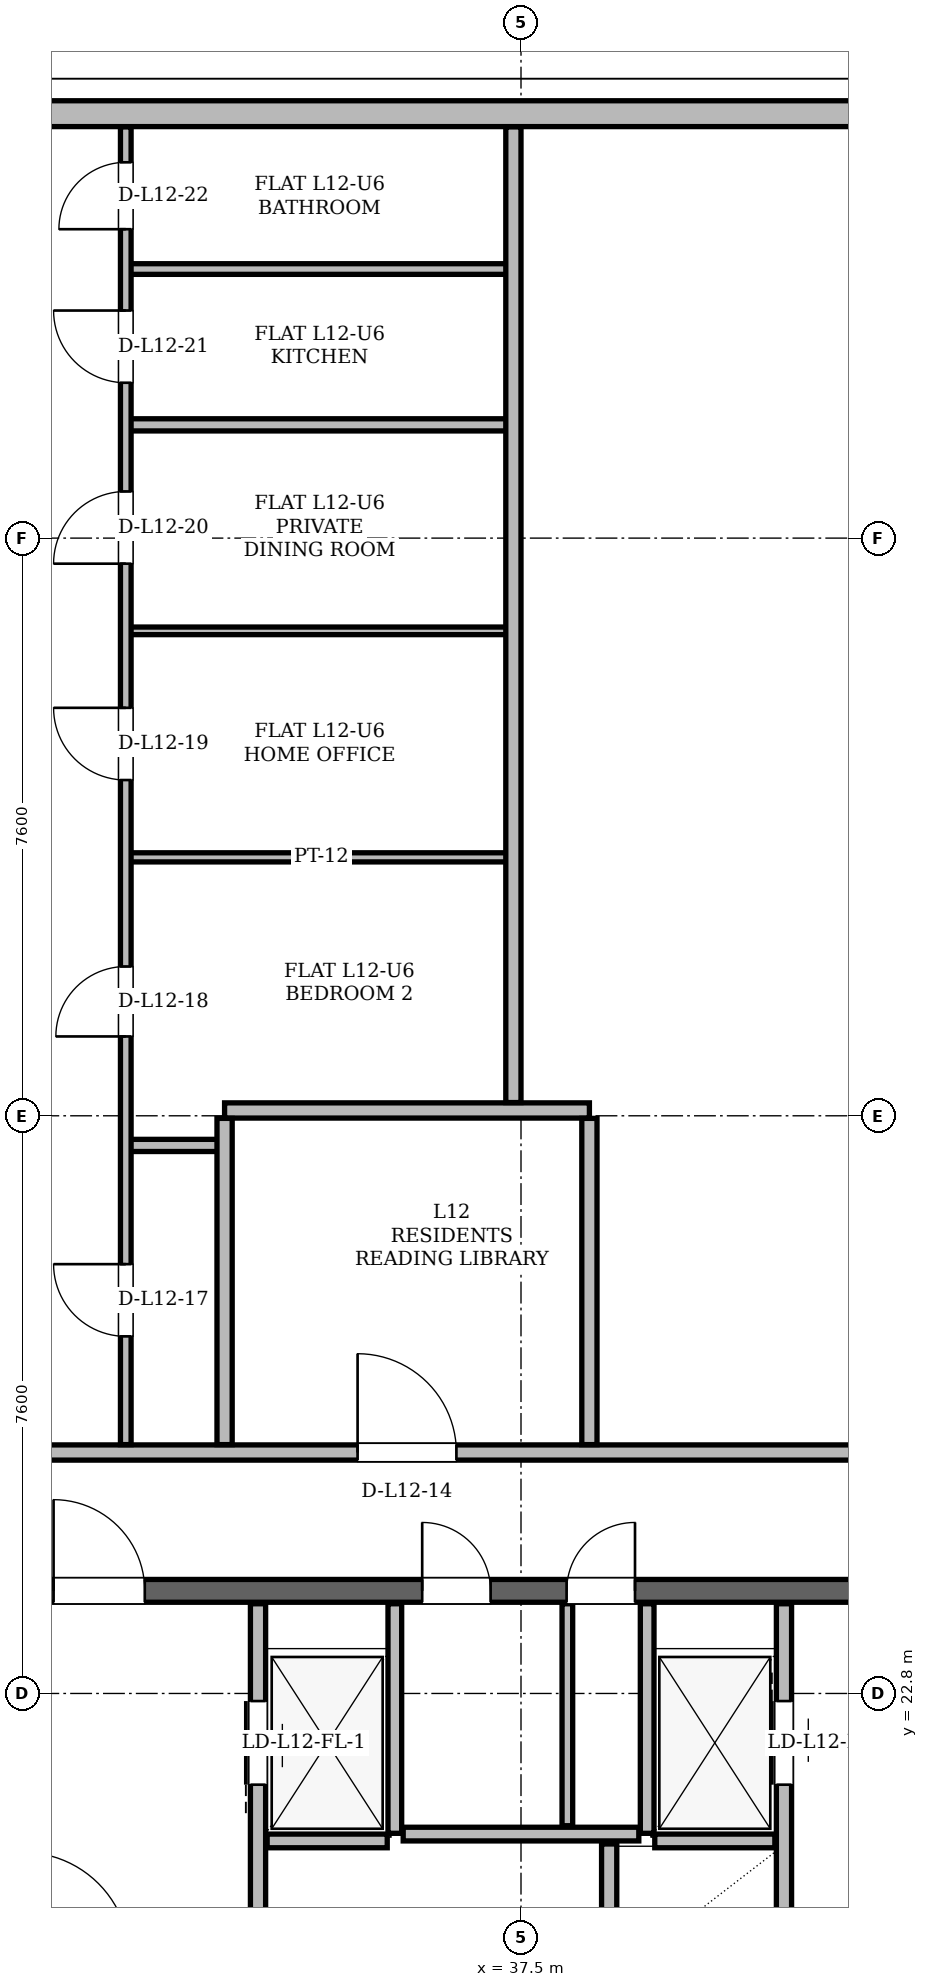
"""IFC4 building model, lengths in metres.
Left out: names, types, materials, properties, quantities, classifications, styles, units other than length and angle.
Written with IfcOpenShell. Run it as: python <this file> out.ifc"""

import sys

from ifc_helpers import new_model, si_unit, direction, frame, frame_2d, origin, place, context, subcontext, project, spatial, rectangle, extrude, element, fill, save


model = new_model("IFC4")
c1 = context("Model", 3, precision=1e-05, world=origin(), true_north=direction((0.0, 1.0)))
c2 = subcontext(c1, "Body", "Model", "MODEL_VIEW")
j1 = project(units=[si_unit("LENGTHUNIT", "METRE"), si_unit("PLANEANGLEUNIT", "RADIAN")], contexts=[c1])
p1 = place(None, origin())
s1 = spatial("IfcSite", under=j1, at=p1, CompositionType="ELEMENT")
p2 = place(p1, origin())
s2 = spatial("IfcBuilding", under=s1, at=p2, CompositionType="ELEMENT")
p3 = place(p2, frame((0.0, 0.0, 48.9)))
s3 = spatial("IfcBuildingStorey", under=s2, at=p3, CompositionType="ELEMENT", Elevation=48.9)
p4 = place(p3, frame((29.65, 24.15, 0.0), z_axis=(0.0, 0.0, 1.0), x_axis=(1.0, 0.0, 0.0)))
e1 = element("IfcWall", 1, at=p4, inside=s3, PredefinedType="SHEAR", context=c2, shape_type="SweptSolid", body=[
    extrude(rectangle(XDim=15.7, YDim=0.3, at=frame_2d((7.85, 0.0))), origin(), (0.0, 0.0, 1.0), 3.36),
])
p5 = place(p4, frame((1.7, 0.0, 0.0)))
e2 = element("IfcOpeningElement", 2, at=p5, cuts=e1, PredefinedType="OPENING", context=c2, shape_type="SweptSolid", body=[
    extrude(rectangle(XDim=1.2, YDim=2.2, at=frame_2d((0.6, 1.1))), frame((0.0, 0.15, 0.0), z_axis=(0.0, -1.0, 0.0), x_axis=(1.0, 0.0, 0.0)), (0.0, 0.0, 1.0), 0.3),
])
p6 = place(p4, frame((12.8, 0.0, 0.0)))
e3 = element("IfcOpeningElement", 3, at=p6, cuts=e1, PredefinedType="OPENING", context=c2, shape_type="SweptSolid", body=[
    extrude(rectangle(XDim=1.2, YDim=2.2, at=frame_2d((0.6, 1.1))), frame((0.0, 0.15, 0.0), z_axis=(0.0, -1.0, 0.0), x_axis=(1.0, 0.0, 0.0)), (0.0, 0.0, 1.0), 0.3),
])
p7 = place(p4, frame((6.55, 0.0, 0.0)))
e4 = element("IfcOpeningElement", 4, at=p7, cuts=e1, PredefinedType="OPENING", context=c2, shape_type="SweptSolid", body=[
    extrude(rectangle(XDim=0.9, YDim=2.05, at=frame_2d((0.45, 1.025))), frame((0.0, 0.15, 0.0), z_axis=(0.0, -1.0, 0.0), x_axis=(1.0, 0.0, 0.0)), (0.0, 0.0, 1.0), 0.3),
])
p8 = place(p4, frame((8.45, 0.0, 0.0)))
e5 = element("IfcOpeningElement", 5, at=p8, cuts=e1, PredefinedType="OPENING", context=c2, shape_type="SweptSolid", body=[
    extrude(rectangle(XDim=0.9, YDim=2.05, at=frame_2d((0.45, 1.025))), frame((0.0, 0.15, 0.0), z_axis=(0.0, -1.0, 0.0), x_axis=(1.0, 0.0, 0.0)), (0.0, 0.0, 1.0), 0.3),
])
p9 = place(p3, frame((44.867, 43.584, 0.0), z_axis=(0.0, 0.0, 1.0), x_axis=(-1.0, 0.0, 0.0)))
e6 = element("IfcWall", 6, at=p9, inside=s3, PredefinedType="SOLIDWALL", context=c2, shape_type="SweptSolid", body=[
    extrude(rectangle(XDim=14.733, YDim=0.34, at=frame_2d((7.367, 0.0))), origin(), (0.0, 0.0, 1.0), 2.494),
])
p10 = place(p3, frame((34.04, 19.48, 0.0), z_axis=(0.0, 0.0, 1.0), x_axis=(0.0, 1.0, 0.0)))
e7 = element("IfcWall", 7, at=p10, inside=s3, PredefinedType="PARTITIONING", context=c2, shape_type="SweptSolid", body=[
    extrude(rectangle(XDim=4.5, YDim=0.2, at=frame_2d((2.25, 0.0))), origin(), (0.0, 0.0, 1.0), 2.4),
])
p11 = place(p10, frame((2.12, 0.0, 0.0)))
e8 = element("IfcOpeningElement", 8, at=p11, cuts=e7, PredefinedType="OPENING", context=c2, shape_type="SweptSolid", body=[
    extrude(rectangle(XDim=1.1, YDim=2.2, at=frame_2d((0.55, 1.1))), frame((0.0, 0.1, 0.0), z_axis=(0.0, -1.0, 0.0), x_axis=(1.0, 0.0, 0.0)), (0.0, 0.0, 1.0), 0.2),
])
p12 = place(p3, frame((35.84, 20.96, 0.0), z_axis=(0.0, 0.0, 1.0), x_axis=(0.0, 1.0, 0.0)))
e9 = element("IfcWall", 9, at=p12, inside=s3, PredefinedType="PARTITIONING", context=c2, shape_type="SweptSolid", body=[
    extrude(rectangle(XDim=3.02, YDim=0.18, at=frame_2d((1.51, 0.0))), origin(), (0.0, 0.0, 1.0), 2.4),
])
p13 = place(p3, frame((34.16, 20.86, 0.0), z_axis=(0.0, 0.0, 1.0), x_axis=(1.0, 0.0, 0.0)))
e10 = element("IfcWall", 10, at=p13, inside=s3, PredefinedType="PARTITIONING", context=c2, shape_type="SweptSolid", body=[
    extrude(rectangle(XDim=1.58, YDim=0.18, at=frame_2d((0.79, 0.0))), origin(), (0.0, 0.0, 1.0), 3.36),
])
p14 = place(p3, frame((40.96, 19.48, 0.0), z_axis=(0.0, 0.0, 1.0), x_axis=(0.0, 1.0, 0.0)))
e11 = element("IfcWall", 11, at=p14, inside=s3, PredefinedType="PARTITIONING", context=c2, shape_type="SweptSolid", body=[
    extrude(rectangle(XDim=4.5, YDim=0.2, at=frame_2d((2.25, 0.0))), origin(), (0.0, 0.0, 1.0), 2.4),
])
p15 = place(p14, frame((2.12, 0.0, 0.0)))
e12 = element("IfcOpeningElement", 12, at=p15, cuts=e11, PredefinedType="OPENING", context=c2, shape_type="SweptSolid", body=[
    extrude(rectangle(XDim=1.1, YDim=2.2, at=frame_2d((0.55, 1.1))), frame((0.0, 0.1, 0.0), z_axis=(0.0, -1.0, 0.0), x_axis=(1.0, 0.0, 0.0)), (0.0, 0.0, 1.0), 0.2),
])
p16 = place(p3, frame((39.16, 20.96, 0.0), z_axis=(0.0, 0.0, 1.0), x_axis=(0.0, 1.0, 0.0)))
e13 = element("IfcWall", 13, at=p16, inside=s3, PredefinedType="PARTITIONING", context=c2, shape_type="SweptSolid", body=[
    extrude(rectangle(XDim=3.02, YDim=0.18, at=frame_2d((1.51, 0.0))), origin(), (0.0, 0.0, 1.0), 2.4),
])
p17 = place(p3, frame((39.26, 20.86, 0.0), z_axis=(0.0, 0.0, 1.0), x_axis=(1.0, 0.0, 0.0)))
e14 = element("IfcWall", 14, at=p17, inside=s3, PredefinedType="PARTITIONING", context=c2, shape_type="SweptSolid", body=[
    extrude(rectangle(XDim=1.58, YDim=0.18, at=frame_2d((0.79, 0.0))), origin(), (0.0, 0.0, 1.0), 3.36),
])
p18 = place(p3, frame((38.66, 11.72, 0.0), z_axis=(0.0, 0.0, 1.0), x_axis=(0.0, 1.0, 0.0)))
e15 = element("IfcWall", 15, at=p18, inside=s3, PredefinedType="PARTITIONING", context=c2, shape_type="SweptSolid", body=[
    extrude(rectangle(XDim=9.1, YDim=0.2, at=frame_2d((4.55, 0.0))), origin(), (0.0, 0.0, 1.0), 3.36),
])
p19 = place(p3, frame((35.95, 20.95, 0.0), z_axis=(0.0, 0.0, 1.0), x_axis=(1.0, 0.0, 0.0)))
e16 = element("IfcWall", 16, at=p19, inside=s3, PredefinedType="PARTITIONING", context=c2, shape_type="SweptSolid", body=[
    extrude(rectangle(XDim=3.1, YDim=0.18, at=frame_2d((1.55, 0.0))), origin(), (0.0, 0.0, 1.0), 3.36),
])
p20 = place(p3, frame((38.11, 21.06, 0.0), z_axis=(0.0, 0.0, 1.0), x_axis=(0.0, 1.0, 0.0)))
e17 = element("IfcWall", 17, at=p20, inside=s3, PredefinedType="PARTITIONING", context=c2, shape_type="SweptSolid", body=[
    extrude(rectangle(XDim=2.92, YDim=0.14, at=frame_2d((1.46, 0.0))), origin(), (0.0, 0.0, 1.0), 2.4),
])
p21 = place(p3, frame((27.55, 25.97, 0.0), z_axis=(0.0, 0.0, 1.0), x_axis=(1.0, 0.0, 0.0)))
e18 = element("IfcWall", 18, at=p21, inside=s3, PredefinedType="PARTITIONING", context=c2, shape_type="SweptSolid", body=[
    extrude(rectangle(XDim=19.9, YDim=0.2, at=frame_2d((9.95, 0.0))), origin(), (0.0, 0.0, 1.0), 2.738),
])
p22 = place(p21, frame((2.042, 0.0, 0.0)))
e19 = element("IfcOpeningElement", 19, at=p22, cuts=e18, PredefinedType="OPENING", context=c2, shape_type="SweptSolid", body=[
    extrude(rectangle(XDim=1.0, YDim=2.18, at=frame_2d((0.5, 1.09))), frame((0.0, 0.1, 0.0), z_axis=(0.0, -1.0, 0.0), x_axis=(1.0, 0.0, 0.0)), (0.0, 0.0, 1.0), 0.2),
])
p23 = place(p21, frame((7.8, 0.0, 0.0)))
e20 = element("IfcOpeningElement", 20, at=p23, cuts=e18, PredefinedType="OPENING", context=c2, shape_type="SweptSolid", body=[
    extrude(rectangle(XDim=1.3, YDim=2.2, at=frame_2d((0.65, 1.1))), frame((0.0, 0.1, 0.0), z_axis=(0.0, -1.0, 0.0), x_axis=(1.0, 0.0, 0.0)), (0.0, 0.0, 1.0), 0.2),
])
p24 = place(p3, frame((32.3, 30.01, 0.0), z_axis=(0.0, 0.0, 1.0), x_axis=(1.0, 0.0, 0.0)))
e21 = element("IfcWall", 21, at=p24, inside=s3, PredefinedType="PARTITIONING", context=c2, shape_type="SweptSolid", body=[
    extrude(rectangle(XDim=1.35, YDim=0.16, at=frame_2d((0.675, 0.0))), origin(), (0.0, 0.0, 1.0), 3.36),
])
p25 = place(p3, frame((33.6, 30.47, 0.0), z_axis=(0.0, 0.0, 1.0), x_axis=(1.0, 0.0, 0.0)))
e22 = element("IfcWall", 22, at=p25, inside=s3, PredefinedType="PARTITIONING", context=c2, shape_type="SweptSolid", body=[
    extrude(rectangle(XDim=4.8, YDim=0.2, at=frame_2d((2.4, 0.0))), origin(), (0.0, 0.0, 1.0), 3.36),
])
p26 = place(p3, frame((32.3, 33.8, 0.0), z_axis=(0.0, 0.0, 1.0), x_axis=(1.0, 0.0, 0.0)))
e23 = element("IfcWall", 23, at=p26, inside=s3, PredefinedType="PARTITIONING", context=c2, shape_type="SweptSolid", body=[
    extrude(rectangle(XDim=5.15, YDim=0.12, at=frame_2d((2.575, 0.0))), origin(), (0.0, 0.0, 1.0), 3.36),
])
p27 = place(p3, frame((32.3, 36.78, 0.0), z_axis=(0.0, 0.0, 1.0), x_axis=(1.0, 0.0, 0.0)))
e24 = element("IfcWall", 24, at=p27, inside=s3, PredefinedType="PARTITIONING", context=c2, shape_type="SweptSolid", body=[
    extrude(rectangle(XDim=5.15, YDim=0.1, at=frame_2d((2.575, 0.0))), origin(), (0.0, 0.0, 1.0), 3.36),
])
p28 = place(p3, frame((32.3, 39.49, 0.0), z_axis=(0.0, 0.0, 1.0), x_axis=(1.0, 0.0, 0.0)))
e25 = element("IfcWall", 25, at=p28, inside=s3, PredefinedType="PARTITIONING", context=c2, shape_type="SweptSolid", body=[
    extrude(rectangle(XDim=5.15, YDim=0.16, at=frame_2d((2.575, 0.0))), origin(), (0.0, 0.0, 1.0), 3.36),
])
p29 = place(p3, frame((32.3, 41.54, 0.0), z_axis=(0.0, 0.0, 1.0), x_axis=(1.0, 0.0, 0.0)))
e26 = element("IfcWall", 26, at=p29, inside=s3, PredefinedType="PARTITIONING", context=c2, shape_type="SweptSolid", body=[
    extrude(rectangle(XDim=5.15, YDim=0.14, at=frame_2d((2.575, 0.0))), origin(), (0.0, 0.0, 1.0), 3.36),
])
p30 = place(p3, frame((32.3, 26.074, 0.0), z_axis=(0.0, 0.0, 1.0), x_axis=(0.0, 1.0, 0.0)))
e27 = element("IfcWall", 27, at=p30, inside=s3, PredefinedType="PARTITIONING", context=c2, shape_type="SweptSolid", body=[
    extrude(rectangle(XDim=17.336, YDim=0.14, at=frame_2d((8.668, 0.0))), origin(), (0.0, 0.0, 1.0), 3.36),
])
p31 = place(p30, frame((1.424, 0.0, 0.0)))
e28 = element("IfcOpeningElement", 28, at=p31, cuts=e27, PredefinedType="OPENING", context=c2, shape_type="SweptSolid", body=[
    extrude(rectangle(XDim=0.95, YDim=2.1, at=frame_2d((0.475, 1.05))), frame((0.0, 0.07, 0.0), z_axis=(0.0, -1.0, 0.0), x_axis=(1.0, 0.0, 0.0)), (0.0, 0.0, 1.0), 0.14),
])
p32 = place(p30, frame((5.37, 0.0, 0.0)))
e29 = element("IfcOpeningElement", 29, at=p32, cuts=e27, PredefinedType="OPENING", context=c2, shape_type="SweptSolid", body=[
    extrude(rectangle(XDim=0.92, YDim=2.12, at=frame_2d((0.46, 1.06))), frame((0.0, 0.07, 0.0), z_axis=(0.0, -1.0, 0.0), x_axis=(1.0, 0.0, 0.0)), (0.0, 0.0, 1.0), 0.14),
])
p33 = place(p30, frame((8.743, 0.0, 0.0)))
e30 = element("IfcOpeningElement", 30, at=p33, cuts=e27, PredefinedType="OPENING", context=c2, shape_type="SweptSolid", body=[
    extrude(rectangle(XDim=0.95, YDim=2.1, at=frame_2d((0.475, 1.05))), frame((0.0, 0.07, 0.0), z_axis=(0.0, -1.0, 0.0), x_axis=(1.0, 0.0, 0.0)), (0.0, 0.0, 1.0), 0.14),
])
p34 = place(p30, frame((11.59, 0.0, 0.0)))
e31 = element("IfcOpeningElement", 31, at=p34, cuts=e27, PredefinedType="OPENING", context=c2, shape_type="SweptSolid", body=[
    extrude(rectangle(XDim=0.95, YDim=2.1, at=frame_2d((0.475, 1.05))), frame((0.0, 0.07, 0.0), z_axis=(0.0, -1.0, 0.0), x_axis=(1.0, 0.0, 0.0)), (0.0, 0.0, 1.0), 0.14),
])
p35 = place(p30, frame((13.97, 0.0, 0.0)))
e32 = element("IfcOpeningElement", 32, at=p35, cuts=e27, PredefinedType="OPENING", context=c2, shape_type="SweptSolid", body=[
    extrude(rectangle(XDim=0.95, YDim=2.1, at=frame_2d((0.475, 1.05))), frame((0.0, 0.07, 0.0), z_axis=(0.0, -1.0, 0.0), x_axis=(1.0, 0.0, 0.0)), (0.0, 0.0, 1.0), 0.14),
])
p36 = place(p30, frame((15.99, 0.0, 0.0)))
e33 = element("IfcOpeningElement", 33, at=p36, cuts=e27, PredefinedType="OPENING", context=c2, shape_type="SweptSolid", body=[
    extrude(rectangle(XDim=0.88, YDim=2.08, at=frame_2d((0.44, 1.04))), frame((0.0, 0.07, 0.0), z_axis=(0.0, -1.0, 0.0), x_axis=(1.0, 0.0, 0.0)), (0.0, 0.0, 1.0), 0.14),
])
p37 = place(p3, frame((33.6, 26.074, 0.0), z_axis=(0.0, 0.0, 1.0), x_axis=(0.0, 1.0, 0.0)))
e34 = element("IfcWall", 34, at=p37, inside=s3, PredefinedType="PARTITIONING", context=c2, shape_type="SweptSolid", body=[
    extrude(rectangle(XDim=4.292, YDim=0.2, at=frame_2d((2.146, 0.0))), origin(), (0.0, 0.0, 1.0), 3.36),
])
p38 = place(p3, frame((37.4, 30.574, 0.0), z_axis=(0.0, 0.0, 1.0), x_axis=(0.0, 1.0, 0.0)))
e35 = element("IfcWall", 35, at=p38, inside=s3, PredefinedType="PARTITIONING", context=c2, shape_type="SweptSolid", body=[
    extrude(rectangle(XDim=12.836, YDim=0.2, at=frame_2d((6.418, 0.0))), origin(), (0.0, 0.0, 1.0), 3.36),
])
p39 = place(p3, frame((38.4, 26.074, 0.0), z_axis=(0.0, 0.0, 1.0), x_axis=(0.0, 1.0, 0.0)))
e36 = element("IfcWall", 36, at=p39, inside=s3, PredefinedType="PARTITIONING", context=c2, shape_type="SweptSolid", body=[
    extrude(rectangle(XDim=4.292, YDim=0.2, at=frame_2d((2.146, 0.0))), origin(), (0.0, 0.0, 1.0), 3.36),
])
p40 = place(p11, origin())
e37 = element("IfcDoor", 37, at=p40, inside=s3, OperationType="SLIDING_TO_LEFT", PredefinedType="DOOR", context=c2, shape_type="SweptSolid", body=[
    extrude(rectangle(XDim=1.1, YDim=2.2, at=frame_2d((0.55, 1.1))), frame((0.0, 0.025, 0.0), z_axis=(0.0, -1.0, 0.0), x_axis=(1.0, 0.0, 0.0)), (0.0, 0.0, 1.0), 0.05),
])
fill(e8, e37)
p41 = place(p15, origin())
e38 = element("IfcDoor", 38, at=p41, inside=s3, OperationType="SLIDING_TO_RIGHT", PredefinedType="DOOR", context=c2, shape_type="SweptSolid", body=[
    extrude(rectangle(XDim=1.1, YDim=2.2, at=frame_2d((0.55, 1.1))), frame((0.0, 0.025, 0.0), z_axis=(0.0, -1.0, 0.0), x_axis=(1.0, 0.0, 0.0)), (0.0, 0.0, 1.0), 0.05),
])
fill(e12, e38)
p42 = place(p5, origin())
e39 = element("IfcDoor", 39, at=p42, inside=s3, OperationType="SINGLE_SWING_LEFT", PredefinedType="DOOR", context=c2, shape_type="SweptSolid", body=[
    extrude(rectangle(XDim=1.2, YDim=2.2, at=frame_2d((0.6, 1.1))), frame((0.0, 0.025, 0.0), z_axis=(0.0, -1.0, 0.0), x_axis=(1.0, 0.0, 0.0)), (0.0, 0.0, 1.0), 0.05),
])
fill(e2, e39)
p43 = place(p7, origin())
e40 = element("IfcDoor", 40, at=p43, inside=s3, OperationType="SINGLE_SWING_LEFT", PredefinedType="DOOR", context=c2, shape_type="SweptSolid", body=[
    extrude(rectangle(XDim=0.9, YDim=2.05, at=frame_2d((0.45, 1.025))), frame((0.0, 0.025, 0.0), z_axis=(0.0, -1.0, 0.0), x_axis=(1.0, 0.0, 0.0)), (0.0, 0.0, 1.0), 0.05),
])
fill(e4, e40)
p44 = place(p8, origin())
e41 = element("IfcDoor", 41, at=p44, inside=s3, OperationType="SINGLE_SWING_RIGHT", PredefinedType="DOOR", context=c2, shape_type="SweptSolid", body=[
    extrude(rectangle(XDim=0.9, YDim=2.05, at=frame_2d((0.45, 1.025))), frame((0.0, 0.025, 0.0), z_axis=(0.0, -1.0, 0.0), x_axis=(1.0, 0.0, 0.0)), (0.0, 0.0, 1.0), 0.05),
])
fill(e5, e41)
p45 = place(p23, origin())
e42 = element("IfcDoor", 42, at=p45, inside=s3, OperationType="SINGLE_SWING_LEFT", PredefinedType="DOOR", context=c2, shape_type="SweptSolid", body=[
    extrude(rectangle(XDim=1.3, YDim=2.2, at=frame_2d((0.65, 1.1))), frame((0.0, 0.025, 0.0), z_axis=(0.0, -1.0, 0.0), x_axis=(1.0, 0.0, 0.0)), (0.0, 0.0, 1.0), 0.05),
])
fill(e20, e42)
p46 = place(p31, origin())
e43 = element("IfcDoor", 43, at=p46, inside=s3, OperationType="SINGLE_SWING_RIGHT", PredefinedType="DOOR", context=c2, shape_type="SweptSolid", body=[
    extrude(rectangle(XDim=0.95, YDim=2.1, at=frame_2d((0.475, 1.05))), frame((0.0, 0.025, 0.0), z_axis=(0.0, -1.0, 0.0), x_axis=(1.0, 0.0, 0.0)), (0.0, 0.0, 1.0), 0.05),
])
fill(e28, e43)
p47 = place(p32, origin())
e44 = element("IfcDoor", 44, at=p47, inside=s3, OperationType="SINGLE_SWING_LEFT", PredefinedType="DOOR", context=c2, shape_type="SweptSolid", body=[
    extrude(rectangle(XDim=0.92, YDim=2.12, at=frame_2d((0.46, 1.06))), frame((0.0, 0.025, 0.0), z_axis=(0.0, -1.0, 0.0), x_axis=(1.0, 0.0, 0.0)), (0.0, 0.0, 1.0), 0.05),
])
fill(e29, e44)
p48 = place(p33, origin())
e45 = element("IfcDoor", 45, at=p48, inside=s3, OperationType="SINGLE_SWING_RIGHT", PredefinedType="DOOR", context=c2, shape_type="SweptSolid", body=[
    extrude(rectangle(XDim=0.95, YDim=2.1, at=frame_2d((0.475, 1.05))), frame((0.0, 0.025, 0.0), z_axis=(0.0, -1.0, 0.0), x_axis=(1.0, 0.0, 0.0)), (0.0, 0.0, 1.0), 0.05),
])
fill(e30, e45)
p49 = place(p34, origin())
e46 = element("IfcDoor", 46, at=p49, inside=s3, OperationType="SINGLE_SWING_LEFT", PredefinedType="DOOR", context=c2, shape_type="SweptSolid", body=[
    extrude(rectangle(XDim=0.95, YDim=2.1, at=frame_2d((0.475, 1.05))), frame((0.0, 0.025, 0.0), z_axis=(0.0, -1.0, 0.0), x_axis=(1.0, 0.0, 0.0)), (0.0, 0.0, 1.0), 0.05),
])
fill(e31, e46)
p50 = place(p35, origin())
e47 = element("IfcDoor", 47, at=p50, inside=s3, OperationType="SINGLE_SWING_RIGHT", PredefinedType="DOOR", context=c2, shape_type="SweptSolid", body=[
    extrude(rectangle(XDim=0.95, YDim=2.1, at=frame_2d((0.475, 1.05))), frame((0.0, 0.025, 0.0), z_axis=(0.0, -1.0, 0.0), x_axis=(1.0, 0.0, 0.0)), (0.0, 0.0, 1.0), 0.05),
])
fill(e32, e47)
p51 = place(p36, origin())
e48 = element("IfcDoor", 48, at=p51, inside=s3, OperationType="SINGLE_SWING_LEFT", PredefinedType="DOOR", context=c2, shape_type="SweptSolid", body=[
    extrude(rectangle(XDim=0.88, YDim=2.08, at=frame_2d((0.44, 1.04))), frame((0.0, 0.025, 0.0), z_axis=(0.0, -1.0, 0.0), x_axis=(1.0, 0.0, 0.0)), (0.0, 0.0, 1.0), 0.05),
])
fill(e33, e48)
save(model, sys.argv[1])
